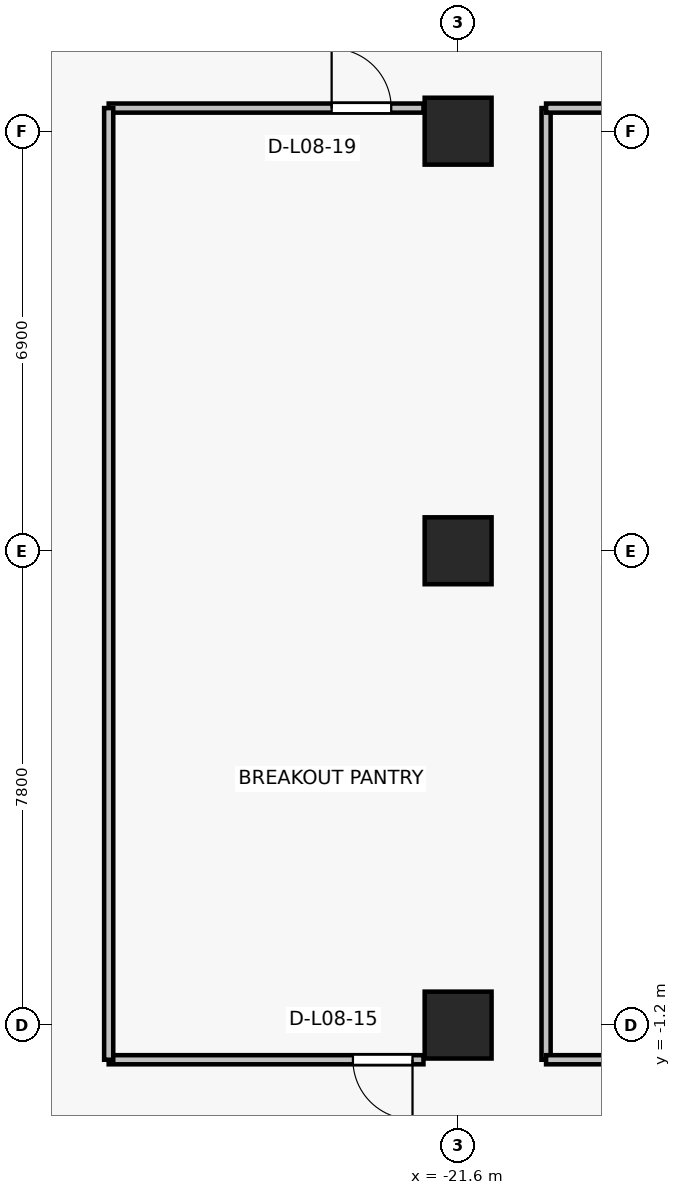
"""IFC4 building model, lengths in metres.
Left out: names, types, materials, properties, quantities, classifications, styles, units other than length and angle.
Written with IfcOpenShell. Run it as: python <this file> out.ifc"""

import sys

from ifc_helpers import new_model, si_unit, direction, frame, frame_2d, origin, origin_2d, place, context, subcontext, project, spatial, rectangle, extrude, source, transform, mapped, element, fill, save


model = new_model("IFC4")
c1 = context("Model", 3, precision=1e-05, world=origin(), true_north=direction((0.0, 1.0)))
c2 = subcontext(c1, "Body", "Model", "MODEL_VIEW")
j1 = project(units=[si_unit("LENGTHUNIT", "METRE"), si_unit("PLANEANGLEUNIT", "RADIAN")], contexts=[c1])
p1 = place(None, origin())
s1 = spatial("IfcSite", under=j1, at=p1, CompositionType="ELEMENT")
p2 = place(p1, origin())
s2 = spatial("IfcBuilding", under=s1, at=p2, CompositionType="ELEMENT")
p3 = place(p2, frame((0.0, 0.0, 34.0)))
s3 = spatial("IfcBuildingStorey", under=s2, at=p3, CompositionType="ELEMENT", Elevation=34.0)
for number, where, z_axis, x_axis in (
    (1, (-21.6, -1.2, 0.0), (0.0, 0.0, 1.0), (1.0, 0.0, 0.0)),
    (2, (-21.6, 6.6, 0.0), (0.0, 0.0, 1.0), (1.0, 0.0, 0.0)),
    (3, (-21.6, 13.5, 0.0), (0.0, 0.0, 1.0), (1.0, 0.0, 0.0)),
):
    element("IfcColumn", number, at=place(p3, frame(where, z_axis=z_axis, x_axis=x_axis)), inside=s3, PredefinedType="COLUMN", context=c2, shape_type="SweptSolid", body=[
        extrude(rectangle(XDim=1.1, YDim=1.1, at=origin_2d()), origin(), (0.0, 0.0, 1.0), 3.3),
    ])
p4 = place(p3, frame((-22.17, -1.77, 0.0), z_axis=(0.0, 0.0, 1.0), x_axis=(-1.0, 0.0, 0.0)))
e4 = element("IfcWall", 4, at=p4, inside=s3, PredefinedType="PARTITIONING", context=c2, shape_type="SweptSolid", body=[
    extrude(rectangle(XDim=5.177, YDim=0.15, at=frame_2d((2.588, 0.0))), origin(), (0.0, 0.0, 1.0), 3.075),
])
p5 = place(p4, frame((0.18, 0.0, 0.0)))
e5 = element("IfcOpeningElement", 5, at=p5, cuts=e4, PredefinedType="OPENING", context=c2, shape_type="SweptSolid", body=[
    extrude(rectangle(XDim=0.98, YDim=2.15, at=frame_2d((0.49, 1.075))), frame((0.0, 0.085, 0.0), z_axis=(0.0, -1.0, 0.0), x_axis=(1.0, 0.0, 0.0)), (0.0, 0.0, 1.0), 0.17),
])
p6 = place(p3, frame((-27.346, 13.88, 0.0), z_axis=(0.0, 0.0, 1.0), x_axis=(1.0, 0.0, 0.0)))
e6 = element("IfcWall", 6, at=p6, inside=s3, PredefinedType="PARTITIONING", context=c2, shape_type="SweptSolid", body=[
    extrude(rectangle(XDim=5.177, YDim=0.15, at=frame_2d((2.588, 0.0))), origin(), (0.0, 0.0, 1.0), 3.075),
])
p7 = place(p6, frame((3.667, 0.0, 0.0)))
e7 = element("IfcOpeningElement", 7, at=p7, cuts=e6, PredefinedType="OPENING", context=c2, shape_type="SweptSolid", body=[
    extrude(rectangle(XDim=0.98, YDim=2.15, at=frame_2d((0.49, 1.075))), frame((0.0, 0.085, 0.0), z_axis=(0.0, -1.0, 0.0), x_axis=(1.0, 0.0, 0.0)), (0.0, 0.0, 1.0), 0.17),
])
for number, where, z_axis, x_axis in (
    (8, (-27.346, -1.77, 0.0), (0.0, 0.0, 1.0), (0.0, 1.0, 0.0)),
    (9, (-20.154, 13.88, 0.0), (0.0, 0.0, 1.0), (0.0, -1.0, 0.0)),
):
    element("IfcWall", number, at=place(p3, frame(where, z_axis=z_axis, x_axis=x_axis)), inside=s3, PredefinedType="PARTITIONING", context=c2, shape_type="SweptSolid", body=[
        extrude(rectangle(XDim=15.65, YDim=0.15, at=frame_2d((7.825, 0.0))), origin(), (0.0, 0.0, 1.0), 2.465),
    ])
p8 = place(p3, frame((-15.02, -1.77, 0.0), z_axis=(0.0, 0.0, 1.0), x_axis=(-1.0, 0.0, 0.0)))
e10 = element("IfcWall", 10, at=p8, inside=s3, PredefinedType="PARTITIONING", context=c2, shape_type="SweptSolid", body=[
    extrude(rectangle(XDim=5.134, YDim=0.15, at=frame_2d((2.567, 0.0))), origin(), (0.0, 0.0, 1.0), 3.075),
])
p9 = place(p8, frame((2.052, 0.0, 0.0)))
e11 = element("IfcOpeningElement", 11, at=p9, cuts=e10, PredefinedType="OPENING", context=c2, shape_type="SweptSolid", body=[
    extrude(rectangle(XDim=0.98, YDim=2.15, at=frame_2d((0.49, 1.075))), frame((0.0, 0.085, 0.0), z_axis=(0.0, -1.0, 0.0), x_axis=(1.0, 0.0, 0.0)), (0.0, 0.0, 1.0), 0.17),
])
p10 = place(p3, frame((-20.154, 13.88, 0.0), z_axis=(0.0, 0.0, 1.0), x_axis=(1.0, 0.0, 0.0)))
e12 = element("IfcWall", 12, at=p10, inside=s3, PredefinedType="PARTITIONING", context=c2, shape_type="SweptSolid", body=[
    extrude(rectangle(XDim=5.134, YDim=0.15, at=frame_2d((2.567, 0.0))), origin(), (0.0, 0.0, 1.0), 3.075),
])
m1 = source(origin(), c2, "Body", "SweptSolid", [
    extrude(rectangle(XDim=0.98, YDim=2.15, at=frame_2d((0.49, 1.075))), frame((0.0, 0.025, 0.0), z_axis=(0.0, -1.0, 0.0), x_axis=(1.0, 0.0, 0.0)), (0.0, 0.0, 1.0), 0.05),
])
p11 = place(p5, origin())
e13 = element("IfcDoor", 13, at=p11, inside=s3, OperationType="SINGLE_SWING_LEFT", PredefinedType="DOOR", context=c2, shape_type="MappedRepresentation", body=[
    mapped(m1, transform((0.0, 0.0, 0.0), x_axis=(1.0, 0.0, 0.0), y_axis=(0.0, 1.0, 0.0), z_axis=(0.0, 0.0, 1.0), scale=1.0)),
])
fill(e5, e13)
p12 = place(p7, origin())
e14 = element("IfcDoor", 14, at=p12, inside=s3, OperationType="SINGLE_SWING_LEFT", PredefinedType="DOOR", context=c2, shape_type="MappedRepresentation", body=[
    mapped(m1, transform((0.0, 0.0, 0.0), x_axis=(1.0, 0.0, 0.0), y_axis=(0.0, 1.0, 0.0), z_axis=(0.0, 0.0, 1.0), scale=1.0)),
])
fill(e7, e14)
save(model, sys.argv[1])
